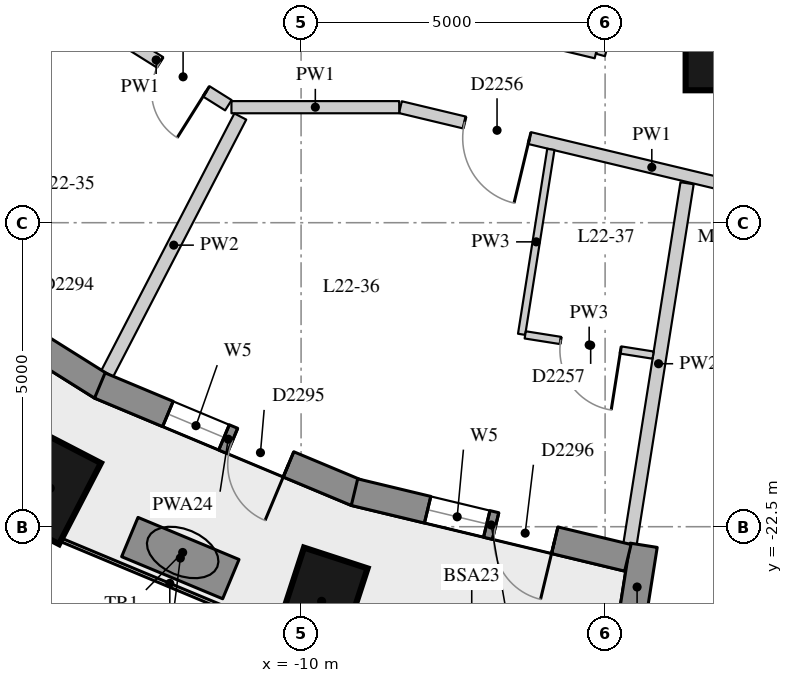
"""IFC4 building model, lengths in metres.
Left out: names, types, materials, properties, quantities, classifications, styles, units other than length and angle.
Written with IfcOpenShell. Run it as: python <this file> out.ifc"""

import sys

from ifc_helpers import new_model, si_unit, direction, frame, frame_2d, origin, origin_2d, place, context, subcontext, project, spatial, rectangle, extrude, element, fill, save


model = new_model("IFC4")
c1 = context("Model", 3, precision=1e-05, world=origin(), true_north=direction((0.0, 1.0)))
c2 = subcontext(c1, "Body", "Model", "MODEL_VIEW")
j1 = project(units=[si_unit("LENGTHUNIT", "METRE"), si_unit("PLANEANGLEUNIT", "RADIAN")], contexts=[c1])
p1 = place(None, origin())
s1 = spatial("IfcSite", under=j1, at=p1, CompositionType="ELEMENT")
p2 = place(p1, origin())
s2 = spatial("IfcBuilding", under=s1, at=p2, CompositionType="ELEMENT")
p3 = place(p2, frame((0.0, 0.0, 81.1)))
s3 = spatial("IfcBuildingStorey", under=s2, at=p3, CompositionType="ELEMENT", Elevation=81.1)
for number, where, z_axis, x_axis in (
    (1, (-14.125, -21.867, 0.0), (0.0, 0.0, 1.0), (-0.46, -0.888, 0.0)),
    (2, (-9.662, -23.727, 0.0), (0.0, 0.0, 1.0), (-0.31, -0.951, 0.0)),
):
    element("IfcColumn", number, at=place(p3, frame(where, z_axis=z_axis, x_axis=x_axis)), inside=s3, PredefinedType="COLUMN", context=c2, shape_type="SweptSolid", body=[
        extrude(rectangle(XDim=1.5, YDim=1.1, at=origin_2d()), origin(), (0.0, 0.0, 1.0), 3.3),
    ])
p4 = place(p3, frame((-3.126, -14.772, 0.0), z_axis=(0.0, 0.0, 1.0), x_axis=(1.0, 0.0, 0.0)))
e3 = element("IfcColumn", 3, at=p4, inside=s3, PredefinedType="COLUMN", context=c2, shape_type="SweptSolid", body=[
    extrude(rectangle(XDim=1.1, YDim=1.1, at=origin_2d()), origin(), (0.0, 0.0, 1.0), 3.3),
])
p5 = place(p3, frame((-4.583, -24.178, 0.0), z_axis=(0.0, 0.0, 1.0), x_axis=(0.156133927791, 0.98773589415, 0.0)))
e4 = element("IfcWall", 4, at=p5, inside=s3, PredefinedType="SOLIDWALL", context=c2, shape_type="SweptSolid", body=[
    extrude(rectangle(XDim=1.39, YDim=0.45, at=frame_2d((0.695, 0.0))), origin(), (0.0, 0.0, 1.0), 2.3),
])
p6 = place(p3, frame((-17.062, -17.819, 0.0), z_axis=(0.0, 0.0, 1.0), x_axis=(0.846990101364, -0.531608660757, 0.0)))
e5 = element("IfcWall", 5, at=p6, inside=s3, PredefinedType="SOLIDWALL", context=c2, shape_type="SweptSolid", body=[
    extrude(rectangle(XDim=4.469, YDim=0.45, at=frame_2d((2.234, 0.0))), origin(), (0.0, 0.0, 1.0), 2.85),
])
p7 = place(p6, frame((1.159, 0.0, 0.4)))
e6 = element("IfcOpeningElement", 6, at=p7, cuts=e5, PredefinedType="OPENING", context=c2, shape_type="SweptSolid", body=[
    extrude(rectangle(XDim=1.0, YDim=1.75, at=frame_2d((0.5, 0.875))), frame((0.0, 0.235, 0.0), z_axis=(0.0, -1.0, 0.0), x_axis=(1.0, 0.0, 0.0)), (0.0, 0.0, 1.0), 0.47),
])
p8 = place(p6, frame((2.31, 0.0, 0.0)))
e7 = element("IfcOpeningElement", 7, at=p8, cuts=e5, PredefinedType="OPENING", context=c2, shape_type="SweptSolid", body=[
    extrude(rectangle(XDim=1.0, YDim=2.15, at=frame_2d((0.5, 1.075))), frame((0.0, 0.235, 0.0), z_axis=(0.0, -1.0, 0.0), x_axis=(1.0, 0.0, 0.0)), (0.0, 0.0, 1.0), 0.47),
])
p9 = place(p3, frame((-13.31, -20.178, 0.0), z_axis=(0.0, 0.0, 1.0), x_axis=(0.922634412489, -0.385675693935, 0.0)))
e8 = element("IfcWall", 8, at=p9, inside=s3, PredefinedType="SOLIDWALL", context=c2, shape_type="SweptSolid", body=[
    extrude(rectangle(XDim=4.577, YDim=0.45, at=frame_2d((2.288, 0.0))), origin(), (0.0, 0.0, 1.0), 2.85),
])
p10 = place(p9, frame((1.213, 0.0, 0.4)))
e9 = element("IfcOpeningElement", 9, at=p10, cuts=e8, PredefinedType="OPENING", context=c2, shape_type="SweptSolid", body=[
    extrude(rectangle(XDim=1.0, YDim=1.75, at=frame_2d((0.5, 0.875))), frame((0.0, 0.235, 0.0), z_axis=(0.0, -1.0, 0.0), x_axis=(1.0, 0.0, 0.0)), (0.0, 0.0, 1.0), 0.47),
])
p11 = place(p9, frame((2.363, 0.0, 0.0)))
e10 = element("IfcOpeningElement", 10, at=p11, cuts=e8, PredefinedType="OPENING", context=c2, shape_type="SweptSolid", body=[
    extrude(rectangle(XDim=1.0, YDim=2.15, at=frame_2d((0.5, 1.075))), frame((0.0, 0.235, 0.0), z_axis=(0.0, -1.0, 0.0), x_axis=(1.0, 0.0, 0.0)), (0.0, 0.0, 1.0), 0.47),
])
p12 = place(p3, frame((-9.122, -21.932, 0.0), z_axis=(0.0, 0.0, 1.0), x_axis=(0.972346547441, -0.233542697764, 0.0)))
e11 = element("IfcWall", 11, at=p12, inside=s3, PredefinedType="SOLIDWALL", context=c2, shape_type="SweptSolid", body=[
    extrude(rectangle(XDim=4.624, YDim=0.45, at=frame_2d((2.312, 0.0))), origin(), (0.0, 0.0, 1.0), 2.85),
])
p13 = place(p12, frame((1.237, 0.0, 0.4)))
e12 = element("IfcOpeningElement", 12, at=p13, cuts=e11, PredefinedType="OPENING", context=c2, shape_type="SweptSolid", body=[
    extrude(rectangle(XDim=1.0, YDim=1.75, at=frame_2d((0.5, 0.875))), frame((0.0, 0.235, 0.0), z_axis=(0.0, -1.0, 0.0), x_axis=(1.0, 0.0, 0.0)), (0.0, 0.0, 1.0), 0.47),
])
p14 = place(p12, frame((2.387, 0.0, 0.0)))
e13 = element("IfcOpeningElement", 13, at=p14, cuts=e11, PredefinedType="OPENING", context=c2, shape_type="SweptSolid", body=[
    extrude(rectangle(XDim=1.0, YDim=2.15, at=frame_2d((0.5, 1.075))), frame((0.0, 0.235, 0.0), z_axis=(0.0, -1.0, 0.0), x_axis=(1.0, 0.0, 0.0)), (0.0, 0.0, 1.0), 0.47),
])
p15 = place(p3, frame((-12.817, -22.67, 0.0), z_axis=(0.0, 0.0, 1.0), x_axis=(0.923000660042, -0.384798364811, 0.0)))
e14 = element("IfcWall", 14, at=p15, inside=s3, PredefinedType="USERDEFINED", context=c2, shape_type="SweptSolid", body=[
    extrude(rectangle(XDim=1.8, YDim=0.7, at=frame_2d((0.9, 0.0))), origin(), (0.0, 0.0, 1.0), 0.75),
])
p16 = place(p3, frame((-0.098, -17.577, 0.0), z_axis=(0.0, 0.0, 1.0), x_axis=(-0.972591034443, 0.232522428425, 0.0)))
e15 = element("IfcWall", 15, at=p16, inside=s3, PredefinedType="PARTITIONING", context=c2, shape_type="SweptSolid", body=[
    extrude(rectangle(XDim=8.501, YDim=0.2, at=frame_2d((4.251, 0.0))), origin(), (0.0, 0.0, 1.0), 2.85),
])
p17 = place(p16, frame((6.318, 0.0, 0.0)))
e16 = element("IfcOpeningElement", 16, at=p17, cuts=e15, PredefinedType="OPENING", context=c2, shape_type="SweptSolid", body=[
    extrude(rectangle(XDim=1.1, YDim=2.1, at=frame_2d((0.55, 1.05))), frame((0.0, 0.11, 0.0), z_axis=(0.0, -1.0, 0.0), x_axis=(1.0, 0.0, 0.0)), (0.0, 0.0, 1.0), 0.22),
])
p18 = place(p16, frame((1.909, 0.0, 0.0)))
e17 = element("IfcOpeningElement", 17, at=p18, cuts=e15, PredefinedType="OPENING", context=c2, shape_type="SweptSolid", body=[
    extrude(rectangle(XDim=1.0, YDim=2.1, at=frame_2d((0.5, 1.05))), frame((0.0, 0.11, 0.0), z_axis=(0.0, -1.0, 0.0), x_axis=(1.0, 0.0, 0.0)), (0.0, 0.0, 1.0), 0.22),
])
p19 = place(p3, frame((-8.386, -15.6, 0.0), z_axis=(0.0, 0.0, 1.0), x_axis=(-1.0, 0.0, 0.0)))
e18 = element("IfcWall", 18, at=p19, inside=s3, PredefinedType="PARTITIONING", context=c2, shape_type="SweptSolid", body=[
    extrude(rectangle(XDim=2.759, YDim=0.2, at=frame_2d((1.379, 0.0))), origin(), (0.0, 0.0, 1.0), 2.85),
])
p20 = place(p3, frame((-11.196, -15.568, 0.0), z_axis=(0.0, 0.0, 1.0), x_axis=(-0.847018542882, 0.531563343369, 0.0)))
e19 = element("IfcWall", 19, at=p20, inside=s3, PredefinedType="PARTITIONING", context=c2, shape_type="SweptSolid", body=[
    extrude(rectangle(XDim=2.804, YDim=0.2, at=frame_2d((1.402, 0.0))), origin(), (0.0, 0.0, 1.0), 2.85),
])
p21 = place(p20, frame((0.429, 0.0, 0.0)))
e20 = element("IfcOpeningElement", 20, at=p21, cuts=e19, PredefinedType="OPENING", context=c2, shape_type="SweptSolid", body=[
    extrude(rectangle(XDim=0.9, YDim=2.1, at=frame_2d((0.45, 1.05))), frame((0.0, 0.11, 0.0), z_axis=(0.0, -1.0, 0.0), x_axis=(1.0, 0.0, 0.0)), (0.0, 0.0, 1.0), 0.22),
])
p22 = place(p3, frame((-4.681, -13.29, 0.0), z_axis=(0.0, 0.0, 1.0), x_axis=(-0.26230696824, -0.964984484027, 0.0)))
e21 = element("IfcWall", 21, at=p22, inside=s3, PredefinedType="PARTITIONING", context=c2, shape_type="SweptSolid", body=[
    extrude(rectangle(XDim=1.504, YDim=0.15, at=frame_2d((0.752, 0.0))), origin(), (0.0, 0.0, 1.0), 2.85),
])
p23 = place(p3, frame((-5.154, -14.723, 0.0), z_axis=(0.0, 0.0, 1.0), x_axis=(-0.97258848944, 0.232533073366, 0.0)))
e22 = element("IfcWall", 22, at=p23, inside=s3, PredefinedType="PARTITIONING", context=c2, shape_type="SweptSolid", body=[
    extrude(rectangle(XDim=2.001, YDim=0.15, at=frame_2d((1.0, 0.0))), origin(), (0.0, 0.0, 1.0), 2.4),
])
p24 = place(p3, frame((-13.189, -19.984, 0.0), z_axis=(0.0, 0.0, 1.0), x_axis=(0.459694761863, 0.888076981976, 0.0)))
e23 = element("IfcWall", 23, at=p24, inside=s3, PredefinedType="PARTITIONING", context=c2, shape_type="SweptSolid", body=[
    extrude(rectangle(XDim=4.764, YDim=0.22, at=frame_2d((2.382, 0.0))), origin(), (0.0, 0.0, 1.0), 2.85),
])
p25 = place(p3, frame((-4.591, -22.789, 0.0), z_axis=(0.0, 0.0, 1.0), x_axis=(0.156141909376, 0.987734632448, 0.0)))
e24 = element("IfcWall", 24, at=p25, inside=s3, PredefinedType="PARTITIONING", context=c2, shape_type="SweptSolid", body=[
    extrude(rectangle(XDim=6.012, YDim=0.22, at=frame_2d((3.006, 0.0))), origin(), (0.0, 0.0, 1.0), 2.3),
])
p26 = place(p3, frame((-5.892, -16.294, 0.0), z_axis=(0.0, 0.0, 1.0), x_axis=(-0.156190565974, -0.987726939544, 0.0)))
e25 = element("IfcWall", 25, at=p26, inside=s3, PredefinedType="PARTITIONING", context=c2, shape_type="SweptSolid", body=[
    extrude(rectangle(XDim=3.079, YDim=0.12, at=frame_2d((1.54, 0.0))), origin(), (0.0, 0.0, 1.0), 2.85),
])
p27 = place(p3, frame((-6.314, -19.345, 0.0), z_axis=(0.0, 0.0, 1.0), x_axis=(0.987720176341, -0.156233329506, 0.0)))
e26 = element("IfcWall", 26, at=p27, inside=s3, PredefinedType="PARTITIONING", context=c2, shape_type="SweptSolid", body=[
    extrude(rectangle(XDim=2.13, YDim=0.12, at=frame_2d((1.065, 0.0))), origin(), (0.0, 0.0, 1.0), 2.85),
])
p28 = place(p27, frame((0.59, 0.0, 0.0)))
e27 = element("IfcOpeningElement", 27, at=p28, cuts=e26, PredefinedType="OPENING", context=c2, shape_type="SweptSolid", body=[
    extrude(rectangle(XDim=1.0, YDim=2.1, at=frame_2d((0.5, 1.05))), frame((0.0, 0.07, 0.0), z_axis=(0.0, -1.0, 0.0), x_axis=(1.0, 0.0, 0.0)), (0.0, 0.0, 1.0), 0.14),
])
p29 = place(p10, origin())
e28 = element("IfcWindow", 28, at=p29, inside=s3, PartitioningType="SINGLE_PANEL", PredefinedType="WINDOW", context=c2, shape_type="SweptSolid", body=[
    extrude(rectangle(XDim=1.0, YDim=1.75, at=frame_2d((0.5, 0.875))), frame((0.0, 0.035, 0.0), z_axis=(0.0, -1.0, 0.0), x_axis=(1.0, 0.0, 0.0)), (0.0, 0.0, 1.0), 0.06),
])
fill(e9, e28)
p30 = place(p11, frame((1.0, 0.0, 0.0), z_axis=(0.0, 0.0, 1.0), x_axis=(-1.0, 0.0, 0.0)))
e29 = element("IfcDoor", 29, at=p30, inside=s3, OperationType="SINGLE_SWING_LEFT", PredefinedType="DOOR", context=c2, shape_type="SweptSolid", body=[
    extrude(rectangle(XDim=1.0, YDim=2.15, at=frame_2d((0.5, 1.075))), frame((0.0, 0.075, 0.0), z_axis=(0.0, -1.0, 0.0), x_axis=(1.0, 0.0, 0.0)), (0.0, 0.0, 1.0), 0.05),
])
fill(e10, e29)
p31 = place(p13, origin())
e30 = element("IfcWindow", 30, at=p31, inside=s3, PartitioningType="SINGLE_PANEL", PredefinedType="WINDOW", context=c2, shape_type="SweptSolid", body=[
    extrude(rectangle(XDim=1.0, YDim=1.75, at=frame_2d((0.5, 0.875))), frame((0.0, 0.035, 0.0), z_axis=(0.0, -1.0, 0.0), x_axis=(1.0, 0.0, 0.0)), (0.0, 0.0, 1.0), 0.06),
])
fill(e12, e30)
p32 = place(p14, frame((1.0, 0.0, 0.0), z_axis=(0.0, 0.0, 1.0), x_axis=(-1.0, 0.0, 0.0)))
e31 = element("IfcDoor", 31, at=p32, inside=s3, OperationType="SINGLE_SWING_LEFT", PredefinedType="DOOR", context=c2, shape_type="SweptSolid", body=[
    extrude(rectangle(XDim=1.0, YDim=2.15, at=frame_2d((0.5, 1.075))), frame((0.0, 0.075, 0.0), z_axis=(0.0, -1.0, 0.0), x_axis=(1.0, 0.0, 0.0)), (0.0, 0.0, 1.0), 0.05),
])
fill(e13, e31)
p33 = place(p21, origin())
e32 = element("IfcDoor", 32, at=p33, inside=s3, OperationType="SINGLE_SWING_LEFT", PredefinedType="DOOR", context=c2, shape_type="SweptSolid", body=[
    extrude(rectangle(XDim=0.9, YDim=2.1, at=frame_2d((0.45, 1.05))), frame((0.0, 0.025, 0.0), z_axis=(0.0, -1.0, 0.0), x_axis=(1.0, 0.0, 0.0)), (0.0, 0.0, 1.0), 0.05),
])
fill(e20, e32)
p34 = place(p17, origin())
e33 = element("IfcDoor", 33, at=p34, inside=s3, OperationType="SINGLE_SWING_LEFT", PredefinedType="DOOR", context=c2, shape_type="SweptSolid", body=[
    extrude(rectangle(XDim=1.1, YDim=2.1, at=frame_2d((0.55, 1.05))), frame((0.0, 0.025, 0.0), z_axis=(0.0, -1.0, 0.0), x_axis=(1.0, 0.0, 0.0)), (0.0, 0.0, 1.0), 0.05),
])
fill(e16, e33)
p35 = place(p28, origin())
e34 = element("IfcDoor", 34, at=p35, inside=s3, OperationType="SINGLE_SWING_LEFT", PredefinedType="DOOR", context=c2, shape_type="SweptSolid", body=[
    extrude(rectangle(XDim=1.0, YDim=2.1, at=frame_2d((0.5, 1.05))), frame((0.0, 0.025, 0.0), z_axis=(0.0, -1.0, 0.0), x_axis=(1.0, 0.0, 0.0)), (0.0, 0.0, 1.0), 0.05),
])
fill(e27, e34)
save(model, sys.argv[1])
